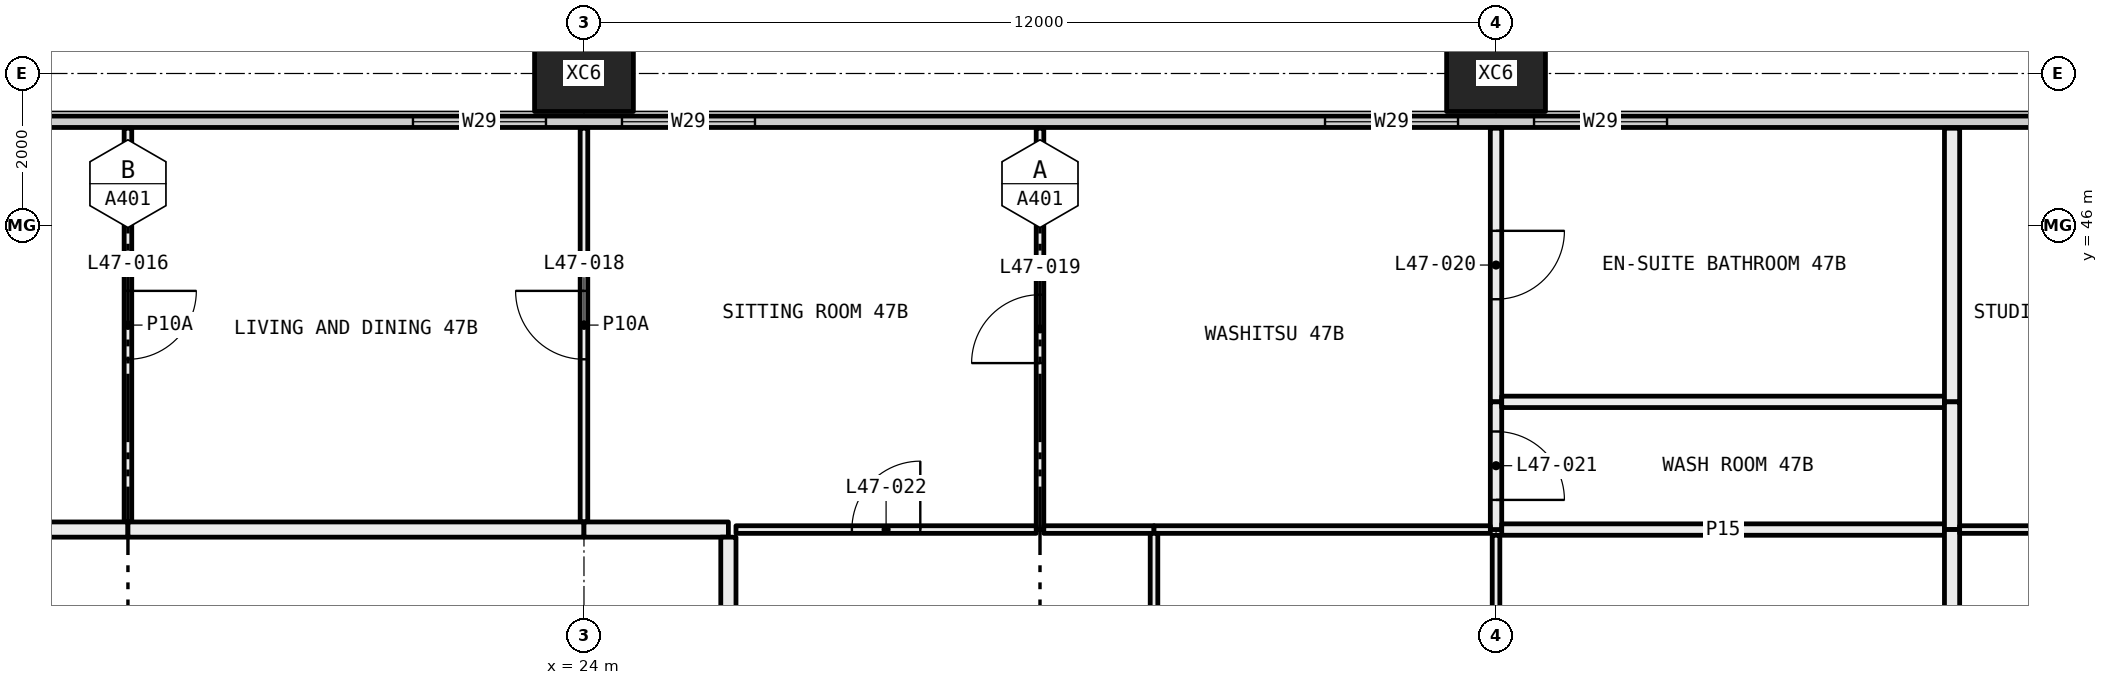
"""IFC4 building model, lengths in metres.
Left out: names, types, materials, properties, quantities, classifications, styles, units other than length and angle.
Written with IfcOpenShell. Run it as: python <this file> out.ifc"""

import sys

from ifc_helpers import new_model, si_unit, direction, frame, frame_2d, origin, origin_2d, place, context, subcontext, project, spatial, rectangle, hollow_rectangle, extrude, element, fill, save


model = new_model("IFC4")
c1 = context("Model", 3, precision=1e-05, world=origin(), true_north=direction((0.0, 1.0)))
c2 = subcontext(c1, "Body", "Model", "MODEL_VIEW")
j1 = project(units=[si_unit("LENGTHUNIT", "METRE"), si_unit("PLANEANGLEUNIT", "RADIAN")], contexts=[c1])
p1 = place(None, origin())
s1 = spatial("IfcSite", under=j1, at=p1, CompositionType="ELEMENT")
p2 = place(p1, origin())
s2 = spatial("IfcBuilding", under=s1, at=p2, CompositionType="ELEMENT")
p3 = place(p2, frame((0.0, 0.0, 178.95)))
s3 = spatial("IfcBuildingStorey", under=s2, at=p3, CompositionType="ELEMENT", Elevation=178.95)
for number, where, z_axis, x_axis in (
    (1, (24.0, 48.0, -0.4), (0.0, 0.0, 1.0), (1.0, 0.0, 0.0)),
    (2, (36.0, 48.0, -0.4), (0.0, 0.0, 1.0), (1.0, 0.0, 0.0)),
):
    element("IfcColumn", number, at=place(p3, frame(where, z_axis=z_axis, x_axis=x_axis)), inside=s3, PredefinedType="COLUMN", context=c2, shape_type="SweptSolid", body=[
        extrude(hollow_rectangle(XDim=1.3, YDim=1.0, WallThickness=0.05, at=origin_2d()), origin(), (0.0, 0.0, 1.0), 3.45),
    ])
p4 = place(p3, frame((6.56, 47.365, 0.0), z_axis=(0.0, 0.0, 1.0), x_axis=(1.0, 0.0, 0.0)))
e3 = element("IfcWall", 3, at=p4, inside=s3, PredefinedType="ELEMENTEDWALL", context=c2, shape_type="SweptSolid", body=[
    extrude(rectangle(XDim=46.88, YDim=0.15, at=frame_2d((23.44, 0.0))), origin(), (0.0, 0.0, 1.0), 3.05),
])
p5 = place(p4, frame((0.44, 0.0, 0.45)))
e4 = element("IfcOpeningElement", 4, at=p5, cuts=e3, PredefinedType="OPENING", context=c2, shape_type="SweptSolid", body=[
    extrude(rectangle(XDim=4.5, YDim=2.55, at=frame_2d((2.25, 1.275))), frame((0.0, 0.085, 0.0), z_axis=(0.0, -1.0, 0.0), x_axis=(1.0, 0.0, 0.0)), (0.0, 0.0, 1.0), 0.17),
])
p6 = place(p4, frame((5.94, 0.0, 0.45)))
e5 = element("IfcOpeningElement", 5, at=p6, cuts=e3, PredefinedType="OPENING", context=c2, shape_type="SweptSolid", body=[
    extrude(rectangle(XDim=1.75, YDim=2.55, at=frame_2d((0.875, 1.275))), frame((0.0, 0.085, 0.0), z_axis=(0.0, -1.0, 0.0), x_axis=(1.0, 0.0, 0.0)), (0.0, 0.0, 1.0), 0.17),
])
p7 = place(p4, frame((15.19, 0.0, 0.45)))
e6 = element("IfcOpeningElement", 6, at=p7, cuts=e3, PredefinedType="OPENING", context=c2, shape_type="SweptSolid", body=[
    extrude(rectangle(XDim=1.75, YDim=2.55, at=frame_2d((0.875, 1.275))), frame((0.0, 0.085, 0.0), z_axis=(0.0, -1.0, 0.0), x_axis=(1.0, 0.0, 0.0)), (0.0, 0.0, 1.0), 0.17),
])
p8 = place(p4, frame((17.94, 0.0, 0.45)))
e7 = element("IfcOpeningElement", 7, at=p8, cuts=e3, PredefinedType="OPENING", context=c2, shape_type="SweptSolid", body=[
    extrude(rectangle(XDim=1.75, YDim=2.55, at=frame_2d((0.875, 1.275))), frame((0.0, 0.085, 0.0), z_axis=(0.0, -1.0, 0.0), x_axis=(1.0, 0.0, 0.0)), (0.0, 0.0, 1.0), 0.17),
])
p9 = place(p4, frame((27.19, 0.0, 0.45)))
e8 = element("IfcOpeningElement", 8, at=p9, cuts=e3, PredefinedType="OPENING", context=c2, shape_type="SweptSolid", body=[
    extrude(rectangle(XDim=1.75, YDim=2.55, at=frame_2d((0.875, 1.275))), frame((0.0, 0.085, 0.0), z_axis=(0.0, -1.0, 0.0), x_axis=(1.0, 0.0, 0.0)), (0.0, 0.0, 1.0), 0.17),
])
p10 = place(p4, frame((29.94, 0.0, 0.45)))
e9 = element("IfcOpeningElement", 9, at=p10, cuts=e3, PredefinedType="OPENING", context=c2, shape_type="SweptSolid", body=[
    extrude(rectangle(XDim=1.75, YDim=2.55, at=frame_2d((0.875, 1.275))), frame((0.0, 0.085, 0.0), z_axis=(0.0, -1.0, 0.0), x_axis=(1.0, 0.0, 0.0)), (0.0, 0.0, 1.0), 0.17),
])
p11 = place(p4, frame((39.19, 0.0, 0.45)))
e10 = element("IfcOpeningElement", 10, at=p11, cuts=e3, PredefinedType="OPENING", context=c2, shape_type="SweptSolid", body=[
    extrude(rectangle(XDim=1.75, YDim=2.55, at=frame_2d((0.875, 1.275))), frame((0.0, 0.085, 0.0), z_axis=(0.0, -1.0, 0.0), x_axis=(1.0, 0.0, 0.0)), (0.0, 0.0, 1.0), 0.17),
])
p12 = place(p4, frame((41.94, 0.0, 0.45)))
e11 = element("IfcOpeningElement", 11, at=p12, cuts=e3, PredefinedType="OPENING", context=c2, shape_type="SweptSolid", body=[
    extrude(rectangle(XDim=4.5, YDim=2.55, at=frame_2d((2.25, 1.275))), frame((0.0, 0.085, 0.0), z_axis=(0.0, -1.0, 0.0), x_axis=(1.0, 0.0, 0.0)), (0.0, 0.0, 1.0), 0.17),
])
p13 = place(p3, frame((18.0, 42.1, 0.0), z_axis=(0.0, 0.0, 1.0), x_axis=(0.0, 1.0, 0.0)))
e12 = element("IfcWall", 12, at=p13, inside=s3, PredefinedType="PARTITIONING", context=c2, shape_type="SweptSolid", body=[
    extrude(rectangle(XDim=5.18, YDim=0.1, at=frame_2d((2.59, 0.0))), origin(), (0.0, 0.0, 1.0), 3.05),
])
p14 = place(p13, frame((2.14, 0.0, 0.0)))
e13 = element("IfcOpeningElement", 13, at=p14, cuts=e12, PredefinedType="OPENING", context=c2, shape_type="SweptSolid", body=[
    extrude(rectangle(XDim=0.9, YDim=2.1, at=frame_2d((0.45, 1.05))), frame((0.0, 0.06, 0.0), z_axis=(0.0, -1.0, 0.0), x_axis=(1.0, 0.0, 0.0)), (0.0, 0.0, 1.0), 0.12),
])
p15 = place(p3, frame((12.0, 42.0, 0.0), z_axis=(0.0, 0.0, 1.0), x_axis=(1.0, 0.0, 0.0)))
e14 = element("IfcWall", 14, at=p15, inside=s3, PredefinedType="PARTITIONING", context=c2, shape_type="SweptSolid", body=[
    extrude(rectangle(XDim=6.0, YDim=0.2, at=frame_2d((3.0, 0.0))), origin(), (0.0, 0.0, 1.0), 3.05),
])
p16 = place(p15, frame((2.5, 0.0, 0.0)))
e15 = element("IfcOpeningElement", 15, at=p16, cuts=e14, PredefinedType="OPENING", context=c2, shape_type="SweptSolid", body=[
    extrude(rectangle(XDim=1.0, YDim=2.1, at=frame_2d((0.5, 1.05))), frame((0.0, 0.11, 0.0), z_axis=(0.0, -1.0, 0.0), x_axis=(1.0, 0.0, 0.0)), (0.0, 0.0, 1.0), 0.22),
])
p17 = place(p3, frame((24.0, 42.1, 0.0), z_axis=(0.0, 0.0, 1.0), x_axis=(0.0, 1.0, 0.0)))
e16 = element("IfcWall", 16, at=p17, inside=s3, PredefinedType="PARTITIONING", context=c2, shape_type="SweptSolid", body=[
    extrude(rectangle(XDim=5.18, YDim=0.1, at=frame_2d((2.59, 0.0))), origin(), (0.0, 0.0, 1.0), 3.05),
])
p18 = place(p17, frame((2.14, 0.0, 0.0)))
e17 = element("IfcOpeningElement", 17, at=p18, cuts=e16, PredefinedType="OPENING", context=c2, shape_type="SweptSolid", body=[
    extrude(rectangle(XDim=0.9, YDim=2.1, at=frame_2d((0.45, 1.05))), frame((0.0, 0.06, 0.0), z_axis=(0.0, -1.0, 0.0), x_axis=(1.0, 0.0, 0.0)), (0.0, 0.0, 1.0), 0.12),
])
p19 = place(p3, frame((18.0, 42.0, 0.0), z_axis=(0.0, 0.0, 1.0), x_axis=(1.0, 0.0, 0.0)))
e18 = element("IfcWall", 18, at=p19, inside=s3, PredefinedType="PARTITIONING", context=c2, shape_type="SweptSolid", body=[
    extrude(rectangle(XDim=6.0, YDim=0.2, at=frame_2d((3.0, 0.0))), origin(), (0.0, 0.0, 1.0), 3.05),
])
p20 = place(p3, frame((30.0, 42.0, 0.0), z_axis=(0.0, 0.0, 1.0), x_axis=(0.0, 1.0, 0.0)))
e19 = element("IfcWall", 19, at=p20, inside=s3, PredefinedType="PARTITIONING", context=c2, shape_type="SweptSolid", body=[
    extrude(rectangle(XDim=5.28, YDim=0.1, at=frame_2d((2.64, 0.0))), origin(), (0.0, 0.0, 1.0), 3.05),
])
p21 = place(p20, frame((2.19, 0.0, 0.0)))
e20 = element("IfcOpeningElement", 20, at=p21, cuts=e19, PredefinedType="OPENING", context=c2, shape_type="SweptSolid", body=[
    extrude(rectangle(XDim=0.9, YDim=2.1, at=frame_2d((0.45, 1.05))), frame((0.0, 0.06, 0.0), z_axis=(0.0, -1.0, 0.0), x_axis=(1.0, 0.0, 0.0)), (0.0, 0.0, 1.0), 0.12),
])
p22 = place(p3, frame((26.0, 42.0, 0.0), z_axis=(0.0, 0.0, 1.0), x_axis=(1.0, 0.0, 0.0)))
e21 = element("IfcWall", 21, at=p22, inside=s3, PredefinedType="PARTITIONING", context=c2, shape_type="SweptSolid", body=[
    extrude(rectangle(XDim=3.95, YDim=0.1, at=frame_2d((1.975, 0.0))), origin(), (0.0, 0.0, 1.0), 3.05),
])
p23 = place(p22, frame((1.525, 0.0, 0.0)))
e22 = element("IfcOpeningElement", 22, at=p23, cuts=e21, PredefinedType="OPENING", context=c2, shape_type="SweptSolid", body=[
    extrude(rectangle(XDim=0.9, YDim=2.1, at=frame_2d((0.45, 1.05))), frame((0.0, 0.06, 0.0), z_axis=(0.0, -1.0, 0.0), x_axis=(1.0, 0.0, 0.0)), (0.0, 0.0, 1.0), 0.12),
])
p24 = place(p3, frame((24.0, 42.0, 0.0), z_axis=(0.0, 0.0, 1.0), x_axis=(1.0, 0.0, 0.0)))
e23 = element("IfcWall", 23, at=p24, inside=s3, PredefinedType="PARTITIONING", context=c2, shape_type="SweptSolid", body=[
    extrude(rectangle(XDim=1.9, YDim=0.2, at=frame_2d((0.95, 0.0))), origin(), (0.0, 0.0, 1.0), 3.05),
])
p25 = place(p3, frame((36.0, 43.68, 0.0), z_axis=(0.0, 0.0, 1.0), x_axis=(0.0, 1.0, 0.0)))
e24 = element("IfcWall", 24, at=p25, inside=s3, PredefinedType="PARTITIONING", context=c2, shape_type="SweptSolid", body=[
    extrude(rectangle(XDim=3.6, YDim=0.15, at=frame_2d((1.8, 0.0))), origin(), (0.0, 0.0, 1.0), 2.45),
])
p26 = place(p25, frame((1.35, 0.0, 0.0)))
e25 = element("IfcOpeningElement", 25, at=p26, cuts=e24, PredefinedType="OPENING", context=c2, shape_type="SweptSolid", body=[
    extrude(rectangle(XDim=0.9, YDim=2.1, at=frame_2d((0.45, 1.05))), frame((0.0, 0.085, 0.0), z_axis=(0.0, -1.0, 0.0), x_axis=(1.0, 0.0, 0.0)), (0.0, 0.0, 1.0), 0.17),
])
p27 = place(p3, frame((36.0, 42.0, 0.0), z_axis=(0.0, 0.0, 1.0), x_axis=(0.0, 1.0, 0.0)))
e26 = element("IfcWall", 26, at=p27, inside=s3, PredefinedType="PARTITIONING", context=c2, shape_type="SweptSolid", body=[
    extrude(rectangle(XDim=1.68, YDim=0.15, at=frame_2d((0.84, 0.0))), origin(), (0.0, 0.0, 1.0), 2.45),
])
p28 = place(p27, frame((0.39, 0.0, 0.0)))
e27 = element("IfcOpeningElement", 27, at=p28, cuts=e26, PredefinedType="OPENING", context=c2, shape_type="SweptSolid", body=[
    extrude(rectangle(XDim=0.9, YDim=2.1, at=frame_2d((0.45, 1.05))), frame((0.0, 0.085, 0.0), z_axis=(0.0, -1.0, 0.0), x_axis=(1.0, 0.0, 0.0)), (0.0, 0.0, 1.0), 0.17),
])
p29 = place(p3, frame((30.05, 42.0, 0.0), z_axis=(0.0, 0.0, 1.0), x_axis=(1.0, 0.0, 0.0)))
e28 = element("IfcWall", 28, at=p29, inside=s3, PredefinedType="PARTITIONING", context=c2, shape_type="SweptSolid", body=[
    extrude(rectangle(XDim=1.45, YDim=0.1, at=frame_2d((0.725, 0.0))), origin(), (0.0, 0.0, 1.0), 3.05),
])
p30 = place(p3, frame((31.5, 42.0, 0.0), z_axis=(0.0, 0.0, 1.0), x_axis=(1.0, 0.0, 0.0)))
e29 = element("IfcWall", 29, at=p30, inside=s3, PredefinedType="PARTITIONING", context=c2, shape_type="SweptSolid", body=[
    extrude(rectangle(XDim=4.425, YDim=0.1, at=frame_2d((2.212, 0.0))), origin(), (0.0, 0.0, 1.0), 2.45),
])
p31 = place(p3, frame((36.075, 43.68, 0.0), z_axis=(0.0, 0.0, 1.0), x_axis=(1.0, 0.0, 0.0)))
e30 = element("IfcWall", 30, at=p31, inside=s3, PredefinedType="PARTITIONING", context=c2, shape_type="SweptSolid", body=[
    extrude(rectangle(XDim=5.825, YDim=0.15, at=frame_2d((2.913, 0.0))), origin(), (0.0, 0.0, 1.0), 2.45),
])
p32 = place(p3, frame((42.0, 43.68, 0.0), z_axis=(0.0, 0.0, 1.0), x_axis=(0.0, 1.0, 0.0)))
e31 = element("IfcWall", 31, at=p32, inside=s3, PredefinedType="PARTITIONING", context=c2, shape_type="SweptSolid", body=[
    extrude(rectangle(XDim=3.6, YDim=0.2, at=frame_2d((1.8, 0.0))), origin(), (0.0, 0.0, 1.0), 3.05),
])
p33 = place(p3, frame((36.075, 42.0, 0.0), z_axis=(0.0, 0.0, 1.0), x_axis=(1.0, 0.0, 0.0)))
e32 = element("IfcWall", 32, at=p33, inside=s3, PredefinedType="PARTITIONING", context=c2, shape_type="SweptSolid", body=[
    extrude(rectangle(XDim=5.825, YDim=0.15, at=frame_2d((2.913, 0.0))), origin(), (0.0, 0.0, 1.0), 2.45),
])
p34 = place(p3, frame((42.0, 42.0, 0.0), z_axis=(0.0, 0.0, 1.0), x_axis=(0.0, 1.0, 0.0)))
e33 = element("IfcWall", 33, at=p34, inside=s3, PredefinedType="PARTITIONING", context=c2, shape_type="SweptSolid", body=[
    extrude(rectangle(XDim=1.68, YDim=0.2, at=frame_2d((0.84, 0.0))), origin(), (0.0, 0.0, 1.0), 3.05),
])
p35 = place(p3, frame((31.5, 36.1, 0.0), z_axis=(0.0, 0.0, 1.0), x_axis=(0.0, 1.0, 0.0)))
e34 = element("IfcWall", 34, at=p35, inside=s3, PredefinedType="PARTITIONING", context=c2, shape_type="SweptSolid", body=[
    extrude(rectangle(XDim=5.85, YDim=0.1, at=frame_2d((2.925, 0.0))), origin(), (0.0, 0.0, 1.0), 3.05),
])
p36 = place(p35, frame((2.475, 0.0, 0.0)))
e35 = element("IfcOpeningElement", 35, at=p36, cuts=e34, PredefinedType="OPENING", context=c2, shape_type="SweptSolid", body=[
    extrude(rectangle(XDim=0.9, YDim=2.1, at=frame_2d((0.45, 1.05))), frame((0.0, 0.06, 0.0), z_axis=(0.0, -1.0, 0.0), x_axis=(1.0, 0.0, 0.0)), (0.0, 0.0, 1.0), 0.12),
])
p37 = place(p3, frame((25.9, 41.9, 0.0), z_axis=(0.0, 0.0, 1.0), x_axis=(0.0, -1.0, 0.0)))
e36 = element("IfcWall", 36, at=p37, inside=s3, PredefinedType="PARTITIONING", context=c2, shape_type="SweptSolid", body=[
    extrude(rectangle(XDim=6.2, YDim=0.2, at=frame_2d((3.1, 0.0))), origin(), (0.0, 0.0, 1.0), 2.45),
])
p38 = place(p3, frame((36.0, 36.65, 0.0), z_axis=(0.0, 0.0, 1.0), x_axis=(0.0, 1.0, 0.0)))
e37 = element("IfcWall", 37, at=p38, inside=s3, PredefinedType="PARTITIONING", context=c2, shape_type="SweptSolid", body=[
    extrude(rectangle(XDim=5.275, YDim=0.1, at=frame_2d((2.638, 0.0))), origin(), (0.0, 0.0, 1.0), 2.45),
])
p39 = place(p38, frame((2.188, 0.0, 0.0)))
e38 = element("IfcOpeningElement", 38, at=p39, cuts=e37, PredefinedType="OPENING", context=c2, shape_type="SweptSolid", body=[
    extrude(rectangle(XDim=0.9, YDim=2.1, at=frame_2d((0.45, 1.05))), frame((0.0, 0.06, 0.0), z_axis=(0.0, -1.0, 0.0), x_axis=(1.0, 0.0, 0.0)), (0.0, 0.0, 1.0), 0.12),
])
p40 = place(p3, frame((42.0, 36.1, 0.0), z_axis=(0.0, 0.0, 1.0), x_axis=(0.0, 1.0, 0.0)))
e39 = element("IfcWall", 39, at=p40, inside=s3, PredefinedType="PARTITIONING", context=c2, shape_type="SweptSolid", body=[
    extrude(rectangle(XDim=5.9, YDim=0.2, at=frame_2d((2.95, 0.0))), origin(), (0.0, 0.0, 1.0), 3.05),
])
p41 = place(p3, frame((42.1, 42.0, 0.0), z_axis=(0.0, 0.0, 1.0), x_axis=(1.0, 0.0, 0.0)))
e40 = element("IfcWall", 40, at=p41, inside=s3, PredefinedType="PARTITIONING", context=c2, shape_type="SweptSolid", body=[
    extrude(rectangle(XDim=3.9, YDim=0.1, at=frame_2d((1.95, 0.0))), origin(), (0.0, 0.0, 1.0), 3.05),
])
p42 = place(p41, frame((1.5, 0.0, 0.0)))
e41 = element("IfcOpeningElement", 41, at=p42, cuts=e40, PredefinedType="OPENING", context=c2, shape_type="SweptSolid", body=[
    extrude(rectangle(XDim=0.9, YDim=2.1, at=frame_2d((0.45, 1.05))), frame((0.0, 0.06, 0.0), z_axis=(0.0, -1.0, 0.0), x_axis=(1.0, 0.0, 0.0)), (0.0, 0.0, 1.0), 0.12),
])
p43 = place(p7, origin())
e42 = element("IfcWindow", 42, at=p43, inside=s3, PartitioningType="SINGLE_PANEL", PredefinedType="WINDOW", context=c2, shape_type="SweptSolid", body=[
    extrude(rectangle(XDim=1.75, YDim=2.55, at=frame_2d((0.875, 1.275))), frame((0.0, 0.03, 0.0), z_axis=(0.0, -1.0, 0.0), x_axis=(1.0, 0.0, 0.0)), (0.0, 0.0, 1.0), 0.06),
])
fill(e6, e42)
p44 = place(p8, origin())
e43 = element("IfcWindow", 43, at=p44, inside=s3, PartitioningType="SINGLE_PANEL", PredefinedType="WINDOW", context=c2, shape_type="SweptSolid", body=[
    extrude(rectangle(XDim=1.75, YDim=2.55, at=frame_2d((0.875, 1.275))), frame((0.0, 0.03, 0.0), z_axis=(0.0, -1.0, 0.0), x_axis=(1.0, 0.0, 0.0)), (0.0, 0.0, 1.0), 0.06),
])
fill(e7, e43)
p45 = place(p9, origin())
e44 = element("IfcWindow", 44, at=p45, inside=s3, PartitioningType="SINGLE_PANEL", PredefinedType="WINDOW", context=c2, shape_type="SweptSolid", body=[
    extrude(rectangle(XDim=1.75, YDim=2.55, at=frame_2d((0.875, 1.275))), frame((0.0, 0.03, 0.0), z_axis=(0.0, -1.0, 0.0), x_axis=(1.0, 0.0, 0.0)), (0.0, 0.0, 1.0), 0.06),
])
fill(e8, e44)
p46 = place(p10, origin())
e45 = element("IfcWindow", 45, at=p46, inside=s3, PartitioningType="SINGLE_PANEL", PredefinedType="WINDOW", context=c2, shape_type="SweptSolid", body=[
    extrude(rectangle(XDim=1.75, YDim=2.55, at=frame_2d((0.875, 1.275))), frame((0.0, 0.03, 0.0), z_axis=(0.0, -1.0, 0.0), x_axis=(1.0, 0.0, 0.0)), (0.0, 0.0, 1.0), 0.06),
])
fill(e9, e45)
p47 = place(p14, frame((0.9, 0.0, 0.0), x_axis=(-1.0, 0.0, 0.0)))
e46 = element("IfcDoor", 46, at=p47, inside=s3, OperationType="SINGLE_SWING_RIGHT", PredefinedType="DOOR", context=c2, shape_type="SweptSolid", body=[
    extrude(rectangle(XDim=0.9, YDim=2.1, at=frame_2d((0.45, 1.05))), frame((0.0, 0.025, 0.0), z_axis=(0.0, -1.0, 0.0), x_axis=(1.0, 0.0, 0.0)), (0.0, 0.0, 1.0), 0.05),
])
fill(e13, e46)
p48 = place(p18, origin())
e47 = element("IfcDoor", 47, at=p48, inside=s3, OperationType="SINGLE_SWING_LEFT", PredefinedType="DOOR", context=c2, shape_type="SweptSolid", body=[
    extrude(rectangle(XDim=0.9, YDim=2.1, at=frame_2d((0.45, 1.05))), frame((0.0, 0.025, 0.0), z_axis=(0.0, -1.0, 0.0), x_axis=(1.0, 0.0, 0.0)), (0.0, 0.0, 1.0), 0.05),
])
fill(e17, e47)
p49 = place(p21, origin())
e48 = element("IfcDoor", 48, at=p49, inside=s3, OperationType="SINGLE_SWING_RIGHT", PredefinedType="DOOR", context=c2, shape_type="SweptSolid", body=[
    extrude(rectangle(XDim=0.9, YDim=2.1, at=frame_2d((0.45, 1.05))), frame((0.0, 0.025, 0.0), z_axis=(0.0, -1.0, 0.0), x_axis=(1.0, 0.0, 0.0)), (0.0, 0.0, 1.0), 0.05),
])
fill(e20, e48)
p50 = place(p26, frame((0.9, 0.0, 0.0), x_axis=(-1.0, 0.0, 0.0)))
e49 = element("IfcDoor", 49, at=p50, inside=s3, OperationType="SINGLE_SWING_RIGHT", PredefinedType="DOOR", context=c2, shape_type="SweptSolid", body=[
    extrude(rectangle(XDim=0.9, YDim=2.1, at=frame_2d((0.45, 1.05))), frame((0.0, 0.025, 0.0), z_axis=(0.0, -1.0, 0.0), x_axis=(1.0, 0.0, 0.0)), (0.0, 0.0, 1.0), 0.05),
])
fill(e25, e49)
p51 = place(p28, frame((0.9, 0.0, 0.0), x_axis=(-1.0, 0.0, 0.0)))
e50 = element("IfcDoor", 50, at=p51, inside=s3, OperationType="SINGLE_SWING_LEFT", PredefinedType="DOOR", context=c2, shape_type="SweptSolid", body=[
    extrude(rectangle(XDim=0.9, YDim=2.1, at=frame_2d((0.45, 1.05))), frame((0.0, 0.025, 0.0), z_axis=(0.0, -1.0, 0.0), x_axis=(1.0, 0.0, 0.0)), (0.0, 0.0, 1.0), 0.05),
])
fill(e27, e50)
p52 = place(p23, origin())
e51 = element("IfcDoor", 51, at=p52, inside=s3, OperationType="SINGLE_SWING_LEFT", PredefinedType="DOOR", context=c2, shape_type="SweptSolid", body=[
    extrude(rectangle(XDim=0.9, YDim=2.1, at=frame_2d((0.45, 1.05))), frame((0.0, 0.025, 0.0), z_axis=(0.0, -1.0, 0.0), x_axis=(1.0, 0.0, 0.0)), (0.0, 0.0, 1.0), 0.05),
])
fill(e22, e51)
save(model, sys.argv[1])
